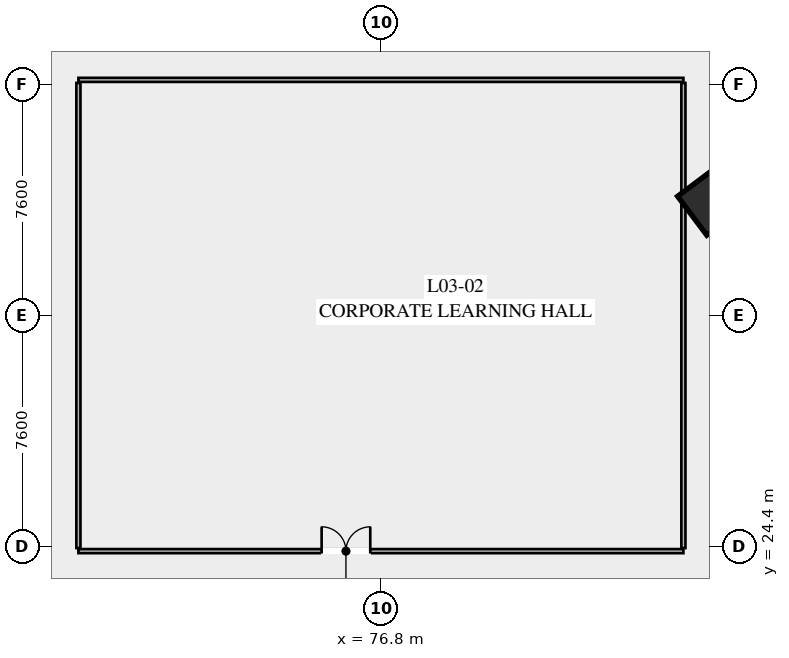
"""IFC4 building model, lengths in metres.
Left out: names, types, materials, properties, quantities, classifications, styles, units other than length and angle.
Written with IfcOpenShell. Run it as: python <this file> out.ifc"""

import sys

from ifc_helpers import new_model, si_unit, direction, frame, frame_2d, origin, origin_2d, place, context, subcontext, project, spatial, rectangle, hollow_rectangle, extrude, element, fill, save


model = new_model("IFC4")
c1 = context("Model", 3, precision=1e-05, world=origin(), true_north=direction((0.0, 1.0)))
c2 = subcontext(c1, "Body", "Model", "MODEL_VIEW")
j1 = project(units=[si_unit("LENGTHUNIT", "METRE"), si_unit("PLANEANGLEUNIT", "RADIAN")], contexts=[c1])
p1 = place(None, origin())
s1 = spatial("IfcSite", under=j1, at=p1, CompositionType="ELEMENT")
p2 = place(p1, origin())
s2 = spatial("IfcBuilding", under=s1, at=p2, CompositionType="ELEMENT")
p3 = place(p2, frame((0.0, 0.0, 15.6)))
s3 = spatial("IfcBuildingStorey", under=s2, at=p3, CompositionType="ELEMENT", Elevation=15.6)
p4 = place(p3, frame((87.68, 35.76, 0.0), z_axis=(0.0, 0.0, 1.0), x_axis=(0.799999996291, 0.600000004945, 0.0)))
e1 = element("IfcColumn", 1, at=p4, inside=s3, PredefinedType="COLUMN", context=c2, shape_type="SweptSolid", body=[
    extrude(hollow_rectangle(XDim=1.6, YDim=1.6, WallThickness=0.06, at=origin_2d()), origin(), (0.0, 0.0, 1.0), 3.9),
])
p5 = place(p3, frame((66.85, 24.25, 0.0), z_axis=(0.0, 0.0, 1.0), x_axis=(1.0, 0.0, 0.0)))
e2 = element("IfcWall", 2, at=p5, inside=s3, PredefinedType="PARTITIONING", context=c2, shape_type="SweptSolid", body=[
    extrude(rectangle(XDim=19.9, YDim=0.135, at=frame_2d((9.95, 0.0))), origin(), (0.0, 0.0, 1.0), 2.943),
])
p6 = place(p5, frame((8.0, 0.0, 0.0)))
e3 = element("IfcOpeningElement", 3, at=p6, cuts=e2, PredefinedType="OPENING", context=c2, shape_type="SweptSolid", body=[
    extrude(rectangle(XDim=1.6, YDim=2.25, at=frame_2d((0.8, 1.125))), frame((0.0, 0.077, 0.0), z_axis=(0.0, -1.0, 0.0), x_axis=(1.0, 0.0, 0.0)), (0.0, 0.0, 1.0), 0.155),
])
for number, where, z_axis, x_axis in (
    (4, (66.85, 24.35, 0.0), (0.0, 0.0, 1.0), (0.0, 1.0, 0.0)),
    (5, (86.75, 24.35, 0.0), (0.0, 0.0, 1.0), (0.0, 1.0, 0.0)),
):
    element("IfcWall", number, at=place(p3, frame(where, z_axis=z_axis, x_axis=x_axis)), inside=s3, PredefinedType="PARTITIONING", context=c2, shape_type="SweptSolid", body=[
        extrude(rectangle(XDim=15.3, YDim=0.135, at=frame_2d((7.65, 0.0))), origin(), (0.0, 0.0, 1.0), 2.943),
    ])
p7 = place(p3, frame((66.85, 39.75, 0.0), z_axis=(0.0, 0.0, 1.0), x_axis=(1.0, 0.0, 0.0)))
e6 = element("IfcWall", 6, at=p7, inside=s3, PredefinedType="PARTITIONING", context=c2, shape_type="SweptSolid", body=[
    extrude(rectangle(XDim=19.9, YDim=0.135, at=frame_2d((9.95, 0.0))), origin(), (0.0, 0.0, 1.0), 2.943),
])
p8 = place(p6, origin())
e7 = element("IfcDoor", 7, at=p8, inside=s3, OperationType="DOUBLE_DOOR_SINGLE_SWING", PredefinedType="DOOR", context=c2, shape_type="SweptSolid", body=[
    extrude(rectangle(XDim=1.6, YDim=2.25, at=frame_2d((0.8, 1.125))), frame((0.0, 0.025, 0.0), z_axis=(0.0, -1.0, 0.0), x_axis=(1.0, 0.0, 0.0)), (0.0, 0.0, 1.0), 0.05),
])
fill(e3, e7)
save(model, sys.argv[1])
